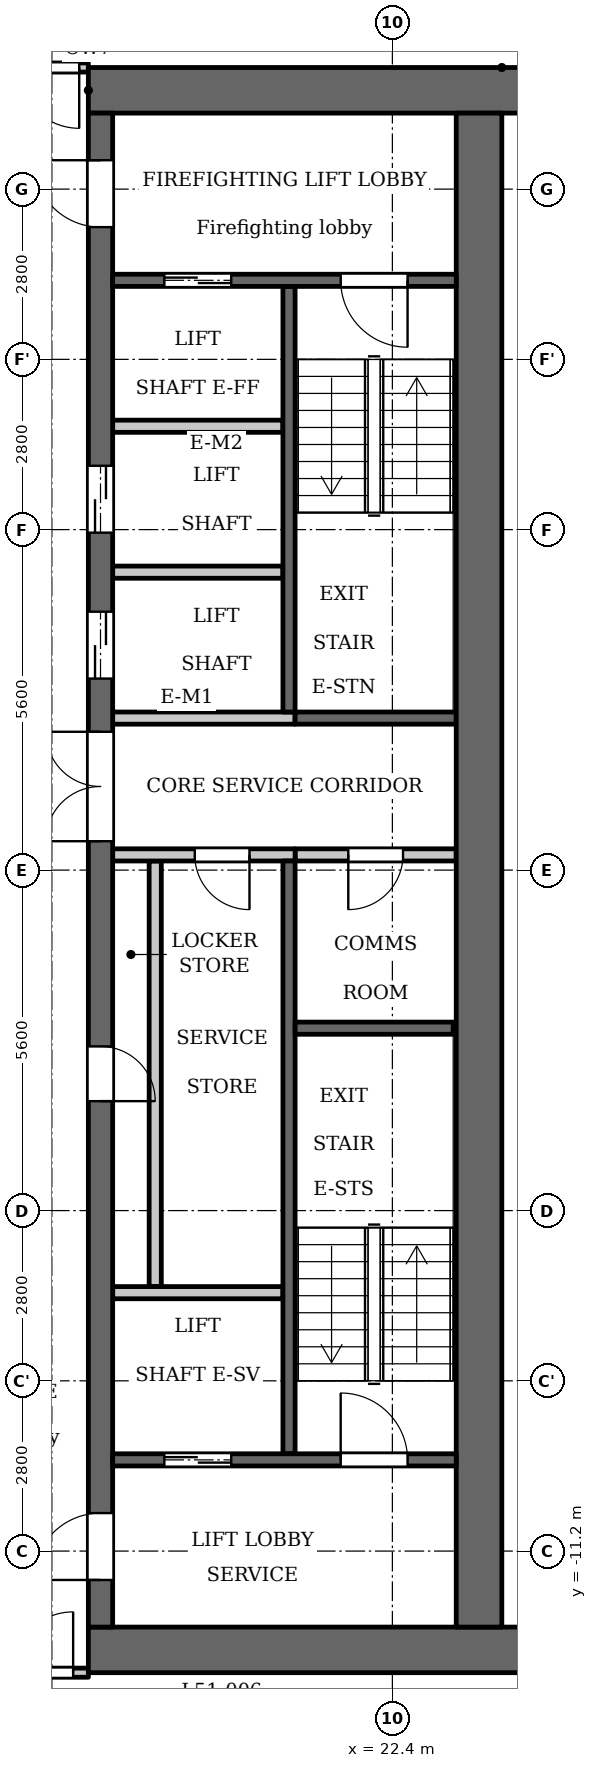
"""IFC4 building model, lengths in metres.
Left out: names, types, materials, properties, quantities, classifications, styles, units other than length and angle.
Written with IfcOpenShell. Run it as: python <this file> out.ifc"""

import sys

from ifc_helpers import new_model, si_unit, direction, frame, frame_2d, origin, place, context, subcontext, project, spatial, rectangle, extrude, element, fill, save


model = new_model("IFC4")
c1 = context("Model", 3, precision=1e-05, world=origin(), true_north=direction((0.0, 1.0)))
c2 = subcontext(c1, "Body", "Model", "MODEL_VIEW")
j1 = project(units=[si_unit("LENGTHUNIT", "METRE"), si_unit("PLANEANGLEUNIT", "RADIAN")], contexts=[c1])
p1 = place(None, origin())
s1 = spatial("IfcSite", under=j1, at=p1, CompositionType="ELEMENT")
p2 = place(p1, origin())
s2 = spatial("IfcBuilding", under=s1, at=p2, CompositionType="ELEMENT")
p3 = place(p2, frame((0.0, 0.0, 199.4)))
s3 = spatial("IfcBuildingStorey", under=s2, at=p3, CompositionType="ELEMENT", Elevation=199.4)
p4 = place(p3, frame((20.7, 2.6, 0.0), z_axis=(0.0, 0.0, 1.0), x_axis=(0.0, 1.0, 0.0)))
e1 = element("IfcWall", 1, at=p4, inside=s3, PredefinedType="SHEAR", context=c2, shape_type="SweptSolid", body=[
    extrude(rectangle(XDim=7.0, YDim=0.2, at=frame_2d((3.5, 0.0))), origin(), (0.0, 0.0, 1.0), 3.2),
])
p5 = place(p3, frame((20.7, -9.6, 0.0), z_axis=(0.0, 0.0, 1.0), x_axis=(0.0, 1.0, 0.0)))
e2 = element("IfcWall", 2, at=p5, inside=s3, PredefinedType="SHEAR", context=c2, shape_type="SweptSolid", body=[
    extrude(rectangle(XDim=9.75, YDim=0.2, at=frame_2d((4.875, 0.0))), origin(), (0.0, 0.0, 1.0), 3.2),
])
p6 = place(p3, frame((20.8, 2.5, 0.0), z_axis=(0.0, 0.0, 1.0), x_axis=(1.0, 0.0, 0.0)))
e3 = element("IfcWall", 3, at=p6, inside=s3, PredefinedType="SHEAR", context=c2, shape_type="SweptSolid", body=[
    extrude(rectangle(XDim=2.65, YDim=0.2, at=frame_2d((1.325, 0.0))), origin(), (0.0, 0.0, 1.0), 3.2),
])
p7 = place(p3, frame((20.8, 0.25, 0.0), z_axis=(0.0, 0.0, 1.0), x_axis=(1.0, 0.0, 0.0)))
e4 = element("IfcWall", 4, at=p7, inside=s3, PredefinedType="PARTITIONING", context=c2, shape_type="SweptSolid", body=[
    extrude(rectangle(XDim=2.65, YDim=0.2, at=frame_2d((1.325, 0.0))), origin(), (0.0, 0.0, 1.0), 3.2),
])
p8 = place(p7, frame((0.875, 0.0, 0.0)))
e5 = element("IfcOpeningElement", 5, at=p8, cuts=e4, PredefinedType="OPENING", context=c2, shape_type="SweptSolid", body=[
    extrude(rectangle(XDim=0.9, YDim=2.1, at=frame_2d((0.45, 1.05))), frame((0.0, 0.11, 0.0), z_axis=(0.0, -1.0, 0.0), x_axis=(1.0, 0.0, 0.0)), (0.0, 0.0, 1.0), 0.22),
])
for number, where, z_axis, x_axis in (
    (6, (17.4, 12.825, 0.0), (0.0, 0.0, 1.0), (1.0, 0.0, 0.0)),
    (7, (17.4, -12.825, 0.0), (0.0, 0.0, 1.0), (1.0, 0.0, 0.0)),
):
    element("IfcWall", number, at=place(p3, frame(where, z_axis=z_axis, x_axis=x_axis)), inside=s3, PredefinedType="SHEAR", context=c2, shape_type="SweptSolid", body=[
        extrude(rectangle(XDim=7.6, YDim=0.75, at=frame_2d((3.8, 0.0))), origin(), (0.0, 0.0, 1.0), 3.2),
    ])
p9 = place(p3, frame((18.5, -6.85, 0.0), z_axis=(0.0, 0.0, 1.0), x_axis=(0.0, 1.0, 0.0)))
e8 = element("IfcWall", 8, at=p9, inside=s3, PredefinedType="PARTITIONING", context=c2, shape_type="SweptSolid", body=[
    extrude(rectangle(XDim=7.0, YDim=0.2, at=frame_2d((3.5, 0.0))), origin(), (0.0, 0.0, 1.0), 3.2),
])
p10 = place(p3, frame((17.6, -12.45, 0.0), z_axis=(0.0, 0.0, 1.0), x_axis=(0.0, 1.0, 0.0)))
e9 = element("IfcWall", 9, at=p10, inside=s3, PredefinedType="SHEAR", context=c2, shape_type="SweptSolid", body=[
    extrude(rectangle(XDim=24.9, YDim=0.4, at=frame_2d((12.45, 0.0))), origin(), (0.0, 0.0, 1.0), 3.2),
])
p11 = place(p10, frame((8.65, 0.0, 0.0)))
e10 = element("IfcOpeningElement", 10, at=p11, cuts=e9, PredefinedType="OPENING", context=c2, shape_type="SweptSolid", body=[
    extrude(rectangle(XDim=0.9, YDim=2.1, at=frame_2d((0.45, 1.05))), frame((0.0, 0.21, 0.0), z_axis=(0.0, -1.0, 0.0), x_axis=(1.0, 0.0, 0.0)), (0.0, 0.0, 1.0), 0.42),
])
p12 = place(p10, frame((15.6, 0.0, 0.0)))
e11 = element("IfcOpeningElement", 11, at=p12, cuts=e9, PredefinedType="OPENING", context=c2, shape_type="SweptSolid", body=[
    extrude(rectangle(XDim=1.1, YDim=2.1, at=frame_2d((0.55, 1.05))), frame((0.0, 0.21, 0.0), z_axis=(0.0, -1.0, 0.0), x_axis=(1.0, 0.0, 0.0)), (0.0, 0.0, 1.0), 0.42),
])
p13 = place(p10, frame((18.0, 0.0, 0.0)))
e12 = element("IfcOpeningElement", 12, at=p13, cuts=e9, PredefinedType="OPENING", context=c2, shape_type="SweptSolid", body=[
    extrude(rectangle(XDim=1.1, YDim=2.1, at=frame_2d((0.55, 1.05))), frame((0.0, 0.21, 0.0), z_axis=(0.0, -1.0, 0.0), x_axis=(1.0, 0.0, 0.0)), (0.0, 0.0, 1.0), 0.42),
])
p14 = place(p10, frame((23.025, 0.0, 0.0)))
e13 = element("IfcOpeningElement", 13, at=p14, cuts=e9, PredefinedType="OPENING", context=c2, shape_type="SweptSolid", body=[
    extrude(rectangle(XDim=1.1, YDim=2.1, at=frame_2d((0.55, 1.05))), frame((0.0, 0.21, 0.0), z_axis=(0.0, -1.0, 0.0), x_axis=(1.0, 0.0, 0.0)), (0.0, 0.0, 1.0), 0.42),
])
p15 = place(p10, frame((0.775, 0.0, 0.0)))
e14 = element("IfcOpeningElement", 14, at=p15, cuts=e9, PredefinedType="OPENING", context=c2, shape_type="SweptSolid", body=[
    extrude(rectangle(XDim=1.1, YDim=2.1, at=frame_2d((0.55, 1.05))), frame((0.0, 0.21, 0.0), z_axis=(0.0, -1.0, 0.0), x_axis=(1.0, 0.0, 0.0)), (0.0, 0.0, 1.0), 0.42),
])
p16 = place(p10, frame((12.925, 0.0, 0.0)))
e15 = element("IfcOpeningElement", 15, at=p16, cuts=e9, PredefinedType="OPENING", context=c2, shape_type="SweptSolid", body=[
    extrude(rectangle(XDim=1.8, YDim=2.1, at=frame_2d((0.9, 1.05))), frame((0.0, 0.21, 0.0), z_axis=(0.0, -1.0, 0.0), x_axis=(1.0, 0.0, 0.0)), (0.0, 0.0, 1.0), 0.42),
])
p17 = place(p3, frame((23.825, -12.45, 0.0), z_axis=(0.0, 0.0, 1.0), x_axis=(0.0, 1.0, 0.0)))
e16 = element("IfcWall", 16, at=p17, inside=s3, PredefinedType="SHEAR", context=c2, shape_type="SweptSolid", body=[
    extrude(rectangle(XDim=24.9, YDim=0.75, at=frame_2d((12.45, 0.0))), origin(), (0.0, 0.0, 1.0), 3.2),
])
p18 = place(p3, frame((17.8, -9.7, 0.0), z_axis=(0.0, 0.0, 1.0), x_axis=(1.0, 0.0, 0.0)))
e17 = element("IfcWall", 17, at=p18, inside=s3, PredefinedType="SHEAR", context=c2, shape_type="SweptSolid", body=[
    extrude(rectangle(XDim=5.65, YDim=0.2, at=frame_2d((2.825, 0.0))), origin(), (0.0, 0.0, 1.0), 3.2),
])
p19 = place(p18, frame((0.85, 0.0, 0.0)))
e18 = element("IfcOpeningElement", 18, at=p19, cuts=e17, PredefinedType="OPENING", context=c2, shape_type="SweptSolid", body=[
    extrude(rectangle(XDim=1.1, YDim=2.1, at=frame_2d((0.55, 1.05))), frame((0.0, 0.11, 0.0), z_axis=(0.0, -1.0, 0.0), x_axis=(1.0, 0.0, 0.0)), (0.0, 0.0, 1.0), 0.22),
])
p20 = place(p18, frame((3.75, 0.0, 0.0)))
e19 = element("IfcOpeningElement", 19, at=p20, cuts=e17, PredefinedType="OPENING", context=c2, shape_type="SweptSolid", body=[
    extrude(rectangle(XDim=1.1, YDim=2.1, at=frame_2d((0.55, 1.05))), frame((0.0, 0.11, 0.0), z_axis=(0.0, -1.0, 0.0), x_axis=(1.0, 0.0, 0.0)), (0.0, 0.0, 1.0), 0.22),
])
p21 = place(p3, frame((17.8, -6.95, 0.0), z_axis=(0.0, 0.0, 1.0), x_axis=(1.0, 0.0, 0.0)))
e20 = element("IfcWall", 20, at=p21, inside=s3, PredefinedType="PARTITIONING", context=c2, shape_type="SweptSolid", body=[
    extrude(rectangle(XDim=2.8, YDim=0.2, at=frame_2d((1.4, 0.0))), origin(), (0.0, 0.0, 1.0), 3.2),
])
p22 = place(p3, frame((17.8, 0.25, 0.0), z_axis=(0.0, 0.0, 1.0), x_axis=(1.0, 0.0, 0.0)))
e21 = element("IfcWall", 21, at=p22, inside=s3, PredefinedType="PARTITIONING", context=c2, shape_type="SweptSolid", body=[
    extrude(rectangle(XDim=3.0, YDim=0.2, at=frame_2d((1.5, 0.0))), origin(), (0.0, 0.0, 1.0), 3.2),
])
p23 = place(p22, frame((1.35, 0.0, 0.0)))
e22 = element("IfcOpeningElement", 22, at=p23, cuts=e21, PredefinedType="OPENING", context=c2, shape_type="SweptSolid", body=[
    extrude(rectangle(XDim=0.9, YDim=2.1, at=frame_2d((0.45, 1.05))), frame((0.0, 0.11, 0.0), z_axis=(0.0, -1.0, 0.0), x_axis=(1.0, 0.0, 0.0)), (0.0, 0.0, 1.0), 0.22),
])
p24 = place(p3, frame((17.8, 2.5, 0.0), z_axis=(0.0, 0.0, 1.0), x_axis=(1.0, 0.0, 0.0)))
e23 = element("IfcWall", 23, at=p24, inside=s3, PredefinedType="PARTITIONING", context=c2, shape_type="SweptSolid", body=[
    extrude(rectangle(XDim=3.0, YDim=0.2, at=frame_2d((1.5, 0.0))), origin(), (0.0, 0.0, 1.0), 3.2),
])
for number, where, z_axis, x_axis in (
    (24, (17.8, 4.9, 0.0), (0.0, 0.0, 1.0), (1.0, 0.0, 0.0)),
    (25, (17.8, 7.3, 0.0), (0.0, 0.0, 1.0), (1.0, 0.0, 0.0)),
):
    element("IfcWall", number, at=place(p3, frame(where, z_axis=z_axis, x_axis=x_axis)), inside=s3, PredefinedType="PARTITIONING", context=c2, shape_type="SweptSolid", body=[
        extrude(rectangle(XDim=2.8, YDim=0.2, at=frame_2d((1.4, 0.0))), origin(), (0.0, 0.0, 1.0), 3.2),
    ])
p25 = place(p3, frame((17.8, 9.7, 0.0), z_axis=(0.0, 0.0, 1.0), x_axis=(1.0, 0.0, 0.0)))
e26 = element("IfcWall", 26, at=p25, inside=s3, PredefinedType="SHEAR", context=c2, shape_type="SweptSolid", body=[
    extrude(rectangle(XDim=5.65, YDim=0.2, at=frame_2d((2.825, 0.0))), origin(), (0.0, 0.0, 1.0), 3.2),
])
p26 = place(p25, frame((0.85, 0.0, 0.0)))
e27 = element("IfcOpeningElement", 27, at=p26, cuts=e26, PredefinedType="OPENING", context=c2, shape_type="SweptSolid", body=[
    extrude(rectangle(XDim=1.1, YDim=2.1, at=frame_2d((0.55, 1.05))), frame((0.0, 0.11, 0.0), z_axis=(0.0, -1.0, 0.0), x_axis=(1.0, 0.0, 0.0)), (0.0, 0.0, 1.0), 0.22),
])
p27 = place(p25, frame((3.75, 0.0, 0.0)))
e28 = element("IfcOpeningElement", 28, at=p27, cuts=e26, PredefinedType="OPENING", context=c2, shape_type="SweptSolid", body=[
    extrude(rectangle(XDim=1.1, YDim=2.1, at=frame_2d((0.55, 1.05))), frame((0.0, 0.11, 0.0), z_axis=(0.0, -1.0, 0.0), x_axis=(1.0, 0.0, 0.0)), (0.0, 0.0, 1.0), 0.22),
])
p28 = place(p3, frame((20.8, -2.6, 0.0), z_axis=(0.0, 0.0, 1.0), x_axis=(1.0, 0.0, 0.0)))
e29 = element("IfcWall", 29, at=p28, inside=s3, PredefinedType="SHEAR", context=c2, shape_type="SweptSolid", body=[
    extrude(rectangle(XDim=2.6, YDim=0.2, at=frame_2d((1.3, 0.0))), origin(), (0.0, 0.0, 1.0), 3.2),
])
p29 = place(p3, frame((-17.4, -13.2, 0.0), z_axis=(0.0, 0.0, 1.0), x_axis=(1.0, 0.0, 0.0)))
e30 = element("IfcWall", 30, at=p29, inside=s3, PredefinedType="PARTITIONING", context=c2, shape_type="SweptSolid", body=[
    extrude(rectangle(XDim=34.8, YDim=0.15, at=frame_2d((17.4, 0.0))), origin(), (0.0, 0.0, 1.0), 3.2),
])
p30 = place(p29, frame((0.15, 0.0, 0.0)))
e31 = element("IfcOpeningElement", 31, at=p30, cuts=e30, PredefinedType="OPENING", context=c2, shape_type="SweptSolid", body=[
    extrude(rectangle(XDim=1.0, YDim=2.1, at=frame_2d((0.5, 1.05))), frame((0.0, 0.085, 0.0), z_axis=(0.0, -1.0, 0.0), x_axis=(1.0, 0.0, 0.0)), (0.0, 0.0, 1.0), 0.17),
])
p31 = place(p29, frame((33.55, 0.0, 0.0)))
e32 = element("IfcOpeningElement", 32, at=p31, cuts=e30, PredefinedType="OPENING", context=c2, shape_type="SweptSolid", body=[
    extrude(rectangle(XDim=1.0, YDim=2.1, at=frame_2d((0.5, 1.05))), frame((0.0, 0.085, 0.0), z_axis=(0.0, -1.0, 0.0), x_axis=(1.0, 0.0, 0.0)), (0.0, 0.0, 1.0), 0.17),
])
p32 = place(p3, frame((-17.4, 13.2, 0.0), z_axis=(0.0, 0.0, 1.0), x_axis=(1.0, 0.0, 0.0)))
e33 = element("IfcWall", 33, at=p32, inside=s3, PredefinedType="PARTITIONING", context=c2, shape_type="SweptSolid", body=[
    extrude(rectangle(XDim=34.8, YDim=0.15, at=frame_2d((17.4, 0.0))), origin(), (0.0, 0.0, 1.0), 3.2),
])
p33 = place(p32, frame((0.25, 0.0, 0.0)))
e34 = element("IfcOpeningElement", 34, at=p33, cuts=e33, PredefinedType="OPENING", context=c2, shape_type="SweptSolid", body=[
    extrude(rectangle(XDim=1.0, YDim=2.1, at=frame_2d((0.5, 1.05))), frame((0.0, 0.085, 0.0), z_axis=(0.0, -1.0, 0.0), x_axis=(1.0, 0.0, 0.0)), (0.0, 0.0, 1.0), 0.17),
])
p34 = place(p32, frame((33.65, 0.0, 0.0)))
e35 = element("IfcOpeningElement", 35, at=p34, cuts=e33, PredefinedType="OPENING", context=c2, shape_type="SweptSolid", body=[
    extrude(rectangle(XDim=1.0, YDim=2.1, at=frame_2d((0.5, 1.05))), frame((0.0, 0.085, 0.0), z_axis=(0.0, -1.0, 0.0), x_axis=(1.0, 0.0, 0.0)), (0.0, 0.0, 1.0), 0.17),
])
p35 = place(p19, origin())
e36 = element("IfcDoor", 36, at=p35, inside=s3, OperationType="DOUBLE_DOOR_SLIDING", PredefinedType="DOOR", context=c2, shape_type="SweptSolid", body=[
    extrude(rectangle(XDim=1.1, YDim=2.1, at=frame_2d((0.55, 1.05))), frame((0.0, 0.025, 0.0), z_axis=(0.0, -1.0, 0.0), x_axis=(1.0, 0.0, 0.0)), (0.0, 0.0, 1.0), 0.05),
])
fill(e18, e36)
p36 = place(p11, origin())
e37 = element("IfcDoor", 37, at=p36, inside=s3, OperationType="SINGLE_SWING_LEFT", PredefinedType="DOOR", context=c2, shape_type="SweptSolid", body=[
    extrude(rectangle(XDim=0.9, YDim=2.1, at=frame_2d((0.45, 1.05))), frame((0.0, 0.025, 0.0), z_axis=(0.0, -1.0, 0.0), x_axis=(1.0, 0.0, 0.0)), (0.0, 0.0, 1.0), 0.05),
])
fill(e10, e37)
p37 = place(p23, origin())
e38 = element("IfcDoor", 38, at=p37, inside=s3, OperationType="SINGLE_SWING_RIGHT", PredefinedType="DOOR", context=c2, shape_type="SweptSolid", body=[
    extrude(rectangle(XDim=0.9, YDim=2.1, at=frame_2d((0.45, 1.05))), frame((0.0, 0.025, 0.0), z_axis=(0.0, -1.0, 0.0), x_axis=(1.0, 0.0, 0.0)), (0.0, 0.0, 1.0), 0.05),
])
fill(e22, e38)
p38 = place(p12, origin())
e39 = element("IfcDoor", 39, at=p38, inside=s3, OperationType="DOUBLE_DOOR_SLIDING", PredefinedType="DOOR", context=c2, shape_type="SweptSolid", body=[
    extrude(rectangle(XDim=1.1, YDim=2.1, at=frame_2d((0.55, 1.05))), frame((0.0, 0.025, 0.0), z_axis=(0.0, -1.0, 0.0), x_axis=(1.0, 0.0, 0.0)), (0.0, 0.0, 1.0), 0.05),
])
fill(e11, e39)
p39 = place(p13, origin())
e40 = element("IfcDoor", 40, at=p39, inside=s3, OperationType="DOUBLE_DOOR_SLIDING", PredefinedType="DOOR", context=c2, shape_type="SweptSolid", body=[
    extrude(rectangle(XDim=1.1, YDim=2.1, at=frame_2d((0.55, 1.05))), frame((0.0, 0.025, 0.0), z_axis=(0.0, -1.0, 0.0), x_axis=(1.0, 0.0, 0.0)), (0.0, 0.0, 1.0), 0.05),
])
fill(e12, e40)
p40 = place(p26, origin())
e41 = element("IfcDoor", 41, at=p40, inside=s3, OperationType="DOUBLE_DOOR_SLIDING", PredefinedType="DOOR", context=c2, shape_type="SweptSolid", body=[
    extrude(rectangle(XDim=1.1, YDim=2.1, at=frame_2d((0.55, 1.05))), frame((0.0, 0.025, 0.0), z_axis=(0.0, -1.0, 0.0), x_axis=(1.0, 0.0, 0.0)), (0.0, 0.0, 1.0), 0.05),
])
fill(e27, e41)
p41 = place(p14, origin())
e42 = element("IfcDoor", 42, at=p41, inside=s3, OperationType="SINGLE_SWING_LEFT", PredefinedType="DOOR", context=c2, shape_type="SweptSolid", body=[
    extrude(rectangle(XDim=1.1, YDim=2.1, at=frame_2d((0.55, 1.05))), frame((0.0, 0.025, 0.0), z_axis=(0.0, -1.0, 0.0), x_axis=(1.0, 0.0, 0.0)), (0.0, 0.0, 1.0), 0.05),
])
fill(e13, e42)
p42 = place(p15, origin())
e43 = element("IfcDoor", 43, at=p42, inside=s3, OperationType="SINGLE_SWING_RIGHT", PredefinedType="DOOR", context=c2, shape_type="SweptSolid", body=[
    extrude(rectangle(XDim=1.1, YDim=2.1, at=frame_2d((0.55, 1.05))), frame((0.0, 0.025, 0.0), z_axis=(0.0, -1.0, 0.0), x_axis=(1.0, 0.0, 0.0)), (0.0, 0.0, 1.0), 0.05),
])
fill(e14, e43)
p43 = place(p27, origin())
e44 = element("IfcDoor", 44, at=p43, inside=s3, OperationType="SINGLE_SWING_RIGHT", PredefinedType="DOOR", context=c2, shape_type="SweptSolid", body=[
    extrude(rectangle(XDim=1.1, YDim=2.1, at=frame_2d((0.55, 1.05))), frame((0.0, 0.025, 0.0), z_axis=(0.0, -1.0, 0.0), x_axis=(1.0, 0.0, 0.0)), (0.0, 0.0, 1.0), 0.05),
])
fill(e28, e44)
p44 = place(p20, origin())
e45 = element("IfcDoor", 45, at=p44, inside=s3, OperationType="SINGLE_SWING_RIGHT", PredefinedType="DOOR", context=c2, shape_type="SweptSolid", body=[
    extrude(rectangle(XDim=1.1, YDim=2.1, at=frame_2d((0.55, 1.05))), frame((0.0, 0.025, 0.0), z_axis=(0.0, -1.0, 0.0), x_axis=(1.0, 0.0, 0.0)), (0.0, 0.0, 1.0), 0.05),
])
fill(e19, e45)
p45 = place(p16, origin())
e46 = element("IfcDoor", 46, at=p45, inside=s3, OperationType="DOUBLE_DOOR_SINGLE_SWING", PredefinedType="DOOR", context=c2, shape_type="SweptSolid", body=[
    extrude(rectangle(XDim=1.8, YDim=2.1, at=frame_2d((0.9, 1.05))), frame((0.0, 0.025, 0.0), z_axis=(0.0, -1.0, 0.0), x_axis=(1.0, 0.0, 0.0)), (0.0, 0.0, 1.0), 0.05),
])
fill(e15, e46)
p46 = place(p8, origin())
e47 = element("IfcDoor", 47, at=p46, inside=s3, OperationType="SINGLE_SWING_LEFT", PredefinedType="DOOR", context=c2, shape_type="SweptSolid", body=[
    extrude(rectangle(XDim=0.9, YDim=2.1, at=frame_2d((0.45, 1.05))), frame((0.0, 0.025, 0.0), z_axis=(0.0, -1.0, 0.0), x_axis=(1.0, 0.0, 0.0)), (0.0, 0.0, 1.0), 0.05),
])
fill(e5, e47)
p47 = place(p34, origin())
e48 = element("IfcDoor", 48, at=p47, inside=s3, OperationType="SINGLE_SWING_RIGHT", PredefinedType="DOOR", context=c2, shape_type="SweptSolid", body=[
    extrude(rectangle(XDim=1.0, YDim=2.1, at=frame_2d((0.5, 1.05))), frame((0.0, 0.025, 0.0), z_axis=(0.0, -1.0, 0.0), x_axis=(1.0, 0.0, 0.0)), (0.0, 0.0, 1.0), 0.05),
])
fill(e35, e48)
p48 = place(p31, origin())
e49 = element("IfcDoor", 49, at=p48, inside=s3, OperationType="SINGLE_SWING_LEFT", PredefinedType="DOOR", context=c2, shape_type="SweptSolid", body=[
    extrude(rectangle(XDim=1.0, YDim=2.1, at=frame_2d((0.5, 1.05))), frame((0.0, 0.025, 0.0), z_axis=(0.0, -1.0, 0.0), x_axis=(1.0, 0.0, 0.0)), (0.0, 0.0, 1.0), 0.05),
])
fill(e32, e49)
save(model, sys.argv[1])
